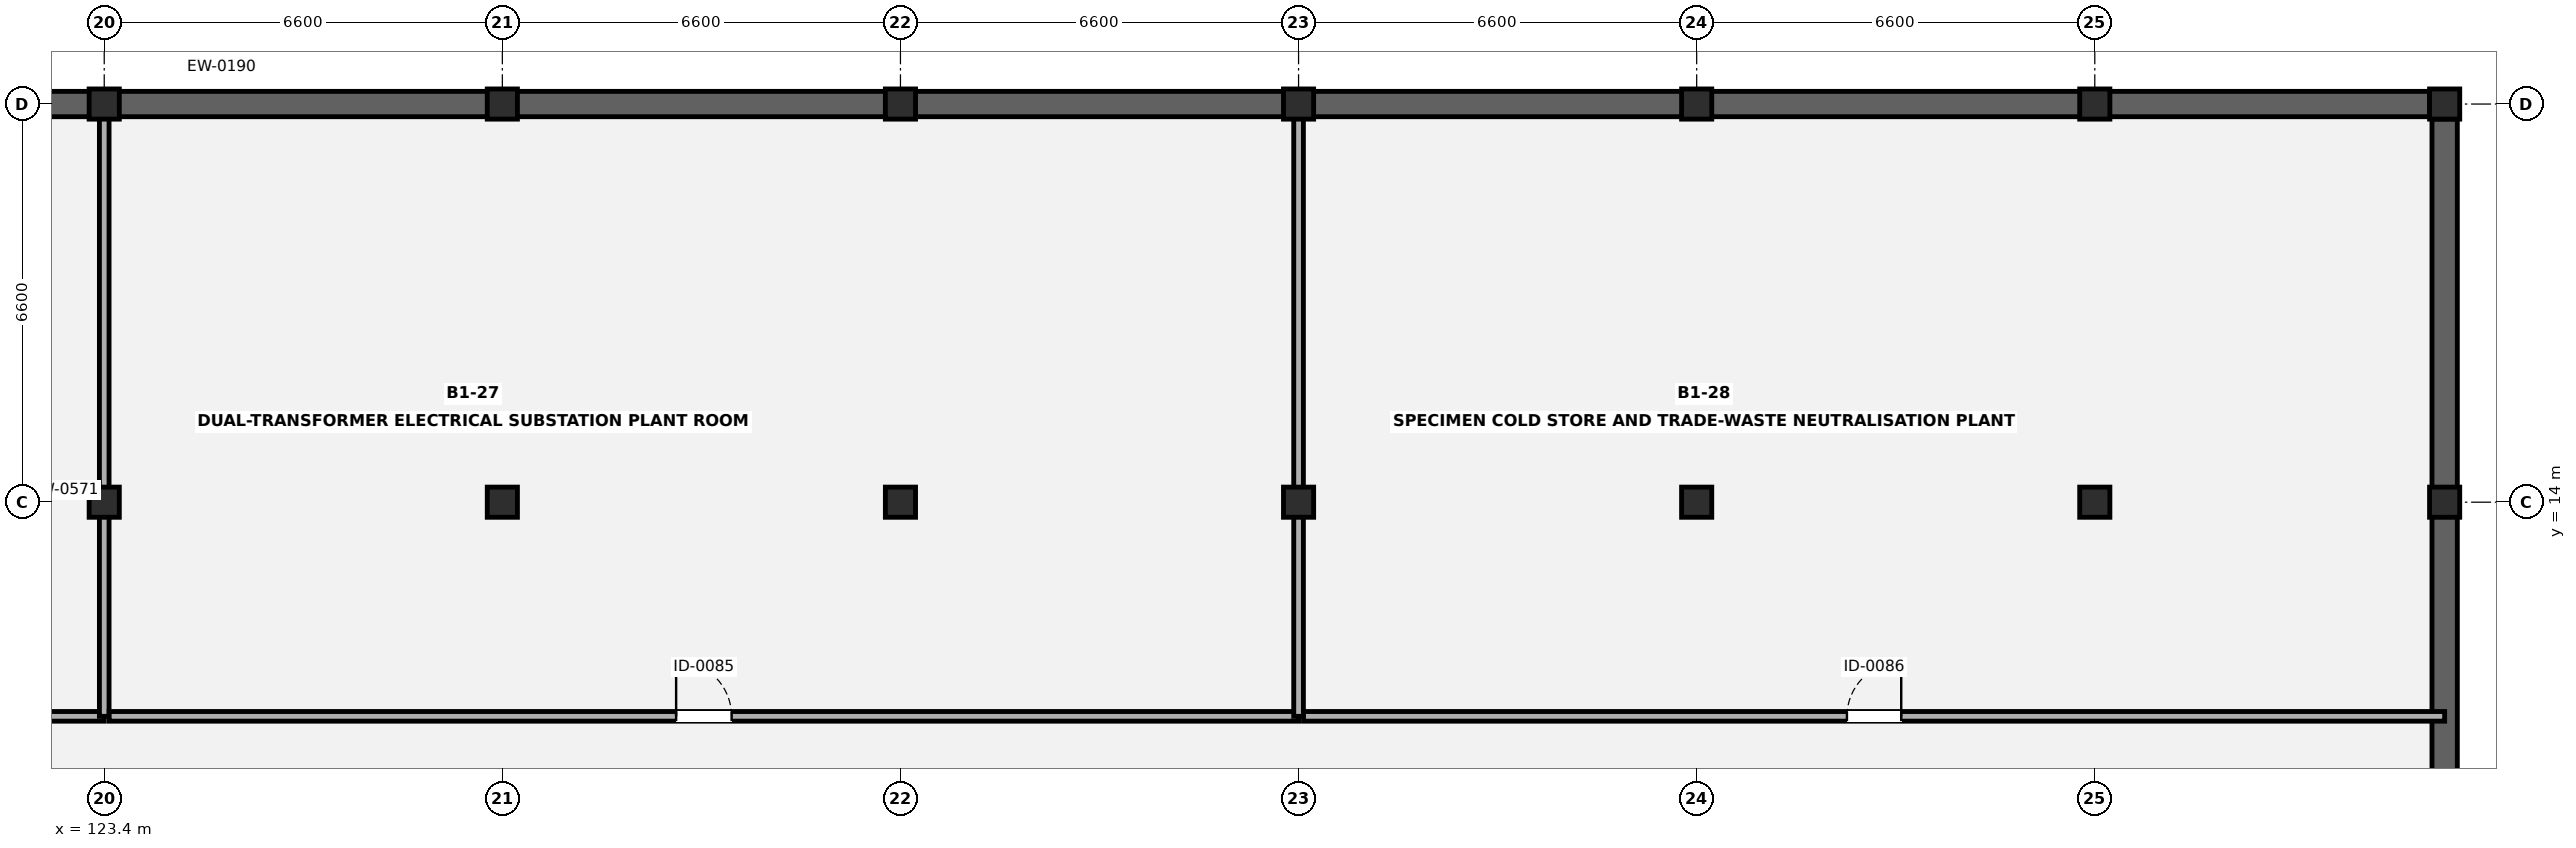
"""IFC4 building model, lengths in metres.
Left out: names, types, materials, properties, quantities, classifications, styles, units other than length and angle.
Written with IfcOpenShell. Run it as: python <this file> out.ifc"""

import sys

from ifc_helpers import new_model, si_unit, direction, frame, frame_2d, origin, origin_2d, place, context, subcontext, project, spatial, rectangle, i_section, extrude, element, fill, save


model = new_model("IFC4")
c1 = context("Model", 3, precision=1e-05, world=origin(), true_north=direction((0.0, 1.0)))
c2 = subcontext(c1, "Body", "Model", "MODEL_VIEW")
j1 = project(units=[si_unit("LENGTHUNIT", "METRE"), si_unit("PLANEANGLEUNIT", "RADIAN")], contexts=[c1])
p1 = place(None, origin())
s1 = spatial("IfcSite", under=j1, at=p1, CompositionType="ELEMENT")
p2 = place(p1, origin())
s2 = spatial("IfcBuilding", under=s1, at=p2, CompositionType="ELEMENT")
p3 = place(p2, frame((0.0, 0.0, -4.2)))
s3 = spatial("IfcBuildingStorey", under=s2, at=p3, CompositionType="ELEMENT", Elevation=-4.2)
for number, where, z_axis, x_axis in (
    (1, (123.4, 14.0, 0.0), (0.0, 0.0, 1.0), (1.0, 0.0, 0.0)),
    (2, (123.4, 20.6, 0.0), (0.0, 0.0, 1.0), (1.0, 0.0, 0.0)),
    (3, (130.0, 14.0, 0.0), (0.0, 0.0, 1.0), (1.0, 0.0, 0.0)),
    (4, (130.0, 20.6, 0.0), (0.0, 0.0, 1.0), (1.0, 0.0, 0.0)),
    (5, (136.6, 14.0, 0.0), (0.0, 0.0, 1.0), (1.0, 0.0, 0.0)),
    (6, (136.6, 20.6, 0.0), (0.0, 0.0, 1.0), (1.0, 0.0, 0.0)),
    (7, (143.2, 14.0, 0.0), (0.0, 0.0, 1.0), (1.0, 0.0, 0.0)),
    (8, (143.2, 20.6, 0.0), (0.0, 0.0, 1.0), (1.0, 0.0, 0.0)),
    (9, (149.8, 14.0, 0.0), (0.0, 0.0, 1.0), (1.0, 0.0, 0.0)),
    (10, (149.8, 20.6, 0.0), (0.0, 0.0, 1.0), (1.0, 0.0, 0.0)),
    (11, (156.4, 14.0, 0.0), (0.0, 0.0, 1.0), (1.0, 0.0, 0.0)),
    (12, (156.4, 20.6, 0.0), (0.0, 0.0, 1.0), (1.0, 0.0, 0.0)),
    (13, (162.2, 14.0, 0.0), (0.0, 0.0, 1.0), (1.0, 0.0, 0.0)),
    (14, (162.2, 20.6, 0.0), (0.0, 0.0, 1.0), (1.0, 0.0, 0.0)),
):
    element("IfcColumn", number, at=place(p3, frame(where, z_axis=z_axis, x_axis=x_axis)), inside=s3, PredefinedType="COLUMN", context=c2, shape_type="SweptSolid", body=[
        extrude(i_section(OverallWidth=0.5, OverallDepth=0.5, WebThickness=0.022, FlangeThickness=0.04, FilletRadius=0.016, at=origin_2d()), origin(), (0.0, 0.0, 1.0), 4.2),
    ])
p4 = place(p3, frame((103.848, 20.6, 0.0), z_axis=(0.0, 0.0, 1.0), x_axis=(1.0, 0.0, 0.0)))
e15 = element("IfcWall", 15, at=p4, inside=s3, PredefinedType="USERDEFINED", context=c2, shape_type="SweptSolid", body=[
    extrude(rectangle(XDim=58.104, YDim=0.42, at=frame_2d((29.052, 0.0))), origin(), (0.0, 0.0, 1.0), 3.85),
])
p5 = place(p3, frame((162.2, 20.352, 0.0), z_axis=(0.0, 0.0, 1.0), x_axis=(0.0, -1.0, 0.0)))
e16 = element("IfcWall", 16, at=p5, inside=s3, PredefinedType="USERDEFINED", context=c2, shape_type="SweptSolid", body=[
    extrude(rectangle(XDim=19.304, YDim=0.42, at=frame_2d((9.652, 0.0))), origin(), (0.0, 0.0, 1.0), 3.85),
])
p6 = place(p3, frame((103.6, 10.45, 0.0), z_axis=(0.0, 0.0, 1.0), x_axis=(1.0, 0.0, 0.0)))
e17 = element("IfcWall", 17, at=p6, inside=s3, PredefinedType="PARTITIONING", context=c2, shape_type="SweptSolid", body=[
    extrude(rectangle(XDim=19.8, YDim=0.16, at=frame_2d((9.9, 0.0))), origin(), (0.0, 0.0, 1.0), 3.546),
])
p7 = place(p6, frame((9.45, 0.0, 0.0)))
e18 = element("IfcOpeningElement", 18, at=p7, cuts=e17, PredefinedType="OPENING", context=c2, shape_type="SweptSolid", body=[
    extrude(rectangle(XDim=0.9, YDim=2.1, at=frame_2d((0.45, 1.05))), frame((0.0, 0.09, 0.0), z_axis=(0.0, -1.0, 0.0), x_axis=(1.0, 0.0, 0.0)), (0.0, 0.0, 1.0), 0.18),
])
p8 = place(p3, frame((123.4, 10.45, 0.0), z_axis=(0.0, 0.0, 1.0), x_axis=(0.0, 1.0, 0.0)))
e19 = element("IfcWall", 19, at=p8, inside=s3, PredefinedType="PARTITIONING", context=c2, shape_type="SweptSolid", body=[
    extrude(rectangle(XDim=10.15, YDim=0.16, at=frame_2d((5.075, 0.0))), origin(), (0.0, 0.0, 1.0), 3.372),
])
p9 = place(p3, frame((123.482, 10.45, 0.0), z_axis=(0.0, 0.0, 1.0), x_axis=(1.0, 0.0, 0.0)))
e20 = element("IfcWall", 20, at=p9, inside=s3, PredefinedType="PARTITIONING", context=c2, shape_type="SweptSolid", body=[
    extrude(rectangle(XDim=19.718, YDim=0.16, at=frame_2d((9.859, 0.0))), origin(), (0.0, 0.0, 1.0), 3.546),
])
p10 = place(p9, frame((9.399, 0.0, 0.0)))
e21 = element("IfcOpeningElement", 21, at=p10, cuts=e20, PredefinedType="OPENING", context=c2, shape_type="SweptSolid", body=[
    extrude(rectangle(XDim=0.92, YDim=2.12, at=frame_2d((0.46, 1.06))), frame((0.0, 0.09, 0.0), z_axis=(0.0, -1.0, 0.0), x_axis=(1.0, 0.0, 0.0)), (0.0, 0.0, 1.0), 0.18),
])
p11 = place(p3, frame((143.2, 10.45, 0.0), z_axis=(0.0, 0.0, 1.0), x_axis=(0.0, 1.0, 0.0)))
e22 = element("IfcWall", 22, at=p11, inside=s3, PredefinedType="PARTITIONING", context=c2, shape_type="SweptSolid", body=[
    extrude(rectangle(XDim=10.15, YDim=0.16, at=frame_2d((5.075, 0.0))), origin(), (0.0, 0.0, 1.0), 3.372),
])
p12 = place(p3, frame((143.282, 10.45, 0.0), z_axis=(0.0, 0.0, 1.0), x_axis=(1.0, 0.0, 0.0)))
e23 = element("IfcWall", 23, at=p12, inside=s3, PredefinedType="PARTITIONING", context=c2, shape_type="SweptSolid", body=[
    extrude(rectangle(XDim=18.918, YDim=0.16, at=frame_2d((9.459, 0.0))), origin(), (0.0, 0.0, 1.0), 3.546),
])
p13 = place(p12, frame((9.009, 0.0, 0.0)))
e24 = element("IfcOpeningElement", 24, at=p13, cuts=e23, PredefinedType="OPENING", context=c2, shape_type="SweptSolid", body=[
    extrude(rectangle(XDim=0.9, YDim=2.1, at=frame_2d((0.45, 1.05))), frame((0.0, 0.09, 0.0), z_axis=(0.0, -1.0, 0.0), x_axis=(1.0, 0.0, 0.0)), (0.0, 0.0, 1.0), 0.18),
])
p14 = place(p10, origin())
e25 = element("IfcDoor", 25, at=p14, inside=s3, OperationType="SINGLE_SWING_LEFT", PredefinedType="DOOR", context=c2, shape_type="SweptSolid", body=[
    extrude(rectangle(XDim=0.92, YDim=2.12, at=frame_2d((0.46, 1.06))), frame((0.0, 0.025, 0.0), z_axis=(0.0, -1.0, 0.0), x_axis=(1.0, 0.0, 0.0)), (0.0, 0.0, 1.0), 0.05),
])
fill(e21, e25)
p15 = place(p13, origin())
e26 = element("IfcDoor", 26, at=p15, inside=s3, OperationType="SINGLE_SWING_RIGHT", PredefinedType="DOOR", context=c2, shape_type="SweptSolid", body=[
    extrude(rectangle(XDim=0.9, YDim=2.1, at=frame_2d((0.45, 1.05))), frame((0.0, 0.025, 0.0), z_axis=(0.0, -1.0, 0.0), x_axis=(1.0, 0.0, 0.0)), (0.0, 0.0, 1.0), 0.05),
])
fill(e24, e26)
save(model, sys.argv[1])
